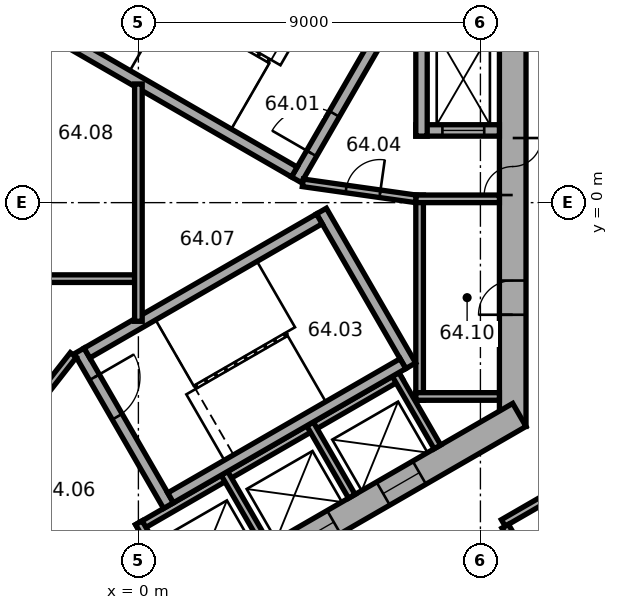
"""IFC4 building model, lengths in metres.
Left out: names, types, materials, properties, quantities, classifications, styles, units other than length and angle.
Written with IfcOpenShell. Run it as: python <this file> out.ifc"""

import sys

from ifc_helpers import new_model, si_unit, direction, frame, frame_2d, origin, place, context, subcontext, project, spatial, rectangle, extrude, element, fill, save


model = new_model("IFC4")
c1 = context("Model", 3, precision=1e-05, world=origin(), true_north=direction((0.0, 1.0)))
c2 = subcontext(c1, "Body", "Model", "MODEL_VIEW")
j1 = project(units=[si_unit("LENGTHUNIT", "METRE"), si_unit("PLANEANGLEUNIT", "RADIAN")], contexts=[c1])
p1 = place(None, origin())
s1 = spatial("IfcSite", under=j1, at=p1, CompositionType="ELEMENT")
p2 = place(p1, origin())
s2 = spatial("IfcBuilding", under=s1, at=p2, CompositionType="ELEMENT")
p3 = place(p2, frame((0.0, 0.0, 259.8)))
s3 = spatial("IfcBuildingStorey", under=s2, at=p3, CompositionType="ELEMENT", Elevation=259.8)
p4 = place(p3, frame((9.85, -5.889, 0.0), z_axis=(0.0, 0.0, 1.0), x_axis=(0.0, 1.0, 0.0)))
e1 = element("IfcWall", 1, at=p4, inside=s3, PredefinedType="SHEAR", context=c2, shape_type="SweptSolid", body=[
    extrude(rectangle(XDim=11.778, YDim=0.7, at=frame_2d((5.889, 0.0))), origin(), (0.0, 0.0, 1.0), 3.7),
])
p5 = place(p4, frame((6.089, 0.0, 0.0)))
e2 = element("IfcOpeningElement", 2, at=p5, cuts=e1, PredefinedType="OPENING", context=c2, shape_type="SweptSolid", body=[
    extrude(rectangle(XDim=1.5, YDim=2.1, at=frame_2d((0.75, 1.05))), frame((0.0, 0.36, 0.0), z_axis=(0.0, -1.0, 0.0), x_axis=(1.0, 0.0, 0.0)), (0.0, 0.0, 1.0), 0.72),
])
p6 = place(p4, frame((2.939, 0.0, 0.0)))
e3 = element("IfcOpeningElement", 3, at=p6, cuts=e1, PredefinedType="OPENING", context=c2, shape_type="SweptSolid", body=[
    extrude(rectangle(XDim=0.9, YDim=2.1, at=frame_2d((0.45, 1.05))), frame((0.0, 0.36, 0.0), z_axis=(0.0, -1.0, 0.0), x_axis=(1.0, 0.0, 0.0)), (0.0, 0.0, 1.0), 0.72),
])
p7 = place(p3, frame((-10.025, -5.586, 0.0), z_axis=(0.0, 0.0, 1.0), x_axis=(0.866026453023, -0.499998182661, 0.0)))
e4 = element("IfcWall", 4, at=p7, inside=s3, PredefinedType="SHEAR", context=c2, shape_type="SweptSolid", body=[
    extrude(rectangle(XDim=11.778, YDim=0.7, at=frame_2d((5.889, 0.0))), origin(), (0.0, 0.0, 1.0), 3.7),
])
p8 = place(p7, frame((6.089, 0.0, 0.0)))
e5 = element("IfcOpeningElement", 5, at=p8, cuts=e4, PredefinedType="OPENING", context=c2, shape_type="SweptSolid", body=[
    extrude(rectangle(XDim=1.5, YDim=2.1, at=frame_2d((0.75, 1.05))), frame((0.0, 0.36, 0.0), z_axis=(0.0, -1.0, 0.0), x_axis=(1.0, 0.0, 0.0)), (0.0, 0.0, 1.0), 0.72),
])
p9 = place(p7, frame((1.539, 0.0, 0.0)))
e6 = element("IfcOpeningElement", 6, at=p9, cuts=e4, PredefinedType="OPENING", context=c2, shape_type="SweptSolid", body=[
    extrude(rectangle(XDim=1.1, YDim=2.1, at=frame_2d((0.55, 1.05))), frame((0.0, 0.36, 0.0), z_axis=(0.0, -1.0, 0.0), x_axis=(1.0, 0.0, 0.0)), (0.0, 0.0, 1.0), 0.72),
])
p10 = place(p7, frame((4.139, 0.0, 0.0)))
e7 = element("IfcOpeningElement", 7, at=p10, cuts=e4, PredefinedType="OPENING", context=c2, shape_type="SweptSolid", body=[
    extrude(rectangle(XDim=1.1, YDim=2.1, at=frame_2d((0.55, 1.05))), frame((0.0, 0.36, 0.0), z_axis=(0.0, -1.0, 0.0), x_axis=(1.0, 0.0, 0.0)), (0.0, 0.0, 1.0), 0.72),
])
p11 = place(p3, frame((-0.175, -11.475, 0.0), z_axis=(0.0, 0.0, 1.0), x_axis=(0.866026453023, 0.499998182661, 0.0)))
e8 = element("IfcWall", 8, at=p11, inside=s3, PredefinedType="SHEAR", context=c2, shape_type="SweptSolid", body=[
    extrude(rectangle(XDim=11.778, YDim=0.7, at=frame_2d((5.889, 0.0))), origin(), (0.0, 0.0, 1.0), 3.7),
])
p12 = place(p11, frame((2.439, 0.0, 0.0)))
e9 = element("IfcOpeningElement", 9, at=p12, cuts=e8, PredefinedType="OPENING", context=c2, shape_type="SweptSolid", body=[
    extrude(rectangle(XDim=1.1, YDim=2.1, at=frame_2d((0.55, 1.05))), frame((0.0, 0.36, 0.0), z_axis=(0.0, -1.0, 0.0), x_axis=(1.0, 0.0, 0.0)), (0.0, 0.0, 1.0), 0.72),
])
p13 = place(p11, frame((5.039, 0.0, 0.0)))
e10 = element("IfcOpeningElement", 10, at=p13, cuts=e8, PredefinedType="OPENING", context=c2, shape_type="SweptSolid", body=[
    extrude(rectangle(XDim=1.1, YDim=2.1, at=frame_2d((0.55, 1.05))), frame((0.0, 0.36, 0.0), z_axis=(0.0, -1.0, 0.0), x_axis=(1.0, 0.0, 0.0)), (0.0, 0.0, 1.0), 0.72),
])
p14 = place(p11, frame((7.639, 0.0, 0.0)))
e11 = element("IfcOpeningElement", 11, at=p14, cuts=e8, PredefinedType="OPENING", context=c2, shape_type="SweptSolid", body=[
    extrude(rectangle(XDim=1.1, YDim=2.1, at=frame_2d((0.55, 1.05))), frame((0.0, 0.36, 0.0), z_axis=(0.0, -1.0, 0.0), x_axis=(1.0, 0.0, 0.0)), (0.0, 0.0, 1.0), 0.72),
])
p15 = place(p3, frame((7.4, -5.2, 0.0), z_axis=(0.0, 0.0, 1.0), x_axis=(0.0, 1.0, 0.0)))
e12 = element("IfcWall", 12, at=p15, inside=s3, PredefinedType="PARTITIONING", context=c2, shape_type="SweptSolid", body=[
    extrude(rectangle(XDim=5.4, YDim=0.2, at=frame_2d((2.7, 0.0))), origin(), (0.0, 0.0, 1.0), 3.42),
])
for number, where, z_axis, x_axis in (
    (13, (7.3, -5.1, 0.0), (0.0, 0.0, 1.0), (1.0, 0.0, 0.0)),
    (14, (7.3, 0.1, 0.0), (0.0, 0.0, 1.0), (1.0, 0.0, 0.0)),
):
    element("IfcWall", number, at=place(p3, frame(where, z_axis=z_axis, x_axis=x_axis)), inside=s3, PredefinedType="PARTITIONING", context=c2, shape_type="SweptSolid", body=[
        extrude(rectangle(XDim=2.2, YDim=0.2, at=frame_2d((1.1, 0.0))), origin(), (0.0, 0.0, 1.0), 3.42),
    ])
p16 = place(p3, frame((-0.024, -8.559, 0.0), z_axis=(0.0, 0.0, 1.0), x_axis=(0.866026010844, 0.49999894854, 0.0)))
e15 = element("IfcWall", 15, at=p16, inside=s3, PredefinedType="PARTITIONING", context=c2, shape_type="SweptSolid", body=[
    extrude(rectangle(XDim=8.0, YDim=0.2, at=frame_2d((4.0, 0.0))), origin(), (0.0, 0.0, 1.0), 3.42),
])
for number, where, z_axis, x_axis in (
    (16, (0.013, -8.422, 0.0), (0.0, 0.0, 1.0), (0.5, -0.866, 0.0)),
    (17, (2.264, -7.122, 0.0), (0.0, 0.0, 1.0), (0.5, -0.866, 0.0)),
    (18, (4.516, -5.822, 0.0), (0.0, 0.0, 1.0), (0.5, -0.866, 0.0)),
    (19, (6.768, -4.522, 0.0), (0.0, 0.0, 1.0), (0.5, -0.866, 0.0)),
):
    element("IfcWall", number, at=place(p3, frame(where, z_axis=z_axis, x_axis=x_axis)), inside=s3, PredefinedType="PARTITIONING", context=c2, shape_type="SweptSolid", body=[
        extrude(rectangle(XDim=2.2, YDim=0.2, at=frame_2d((1.1, 0.0))), origin(), (0.0, 0.0, 1.0), 3.42),
    ])
p17 = place(p3, frame((4.158, 0.602, 0.0), z_axis=(0.0, 0.0, 1.0), x_axis=(0.499977259774, 0.866038532462, 0.0)))
e20 = element("IfcWall", 20, at=p17, inside=s3, PredefinedType="SHEAR", context=c2, shape_type="SweptSolid", body=[
    extrude(rectangle(XDim=4.7, YDim=0.3, at=frame_2d((2.35, 0.0))), origin(), (0.0, 0.0, 1.0), 3.42),
])
p18 = place(p17, frame((0.8, 0.0, 0.0)))
e21 = element("IfcOpeningElement", 21, at=p18, cuts=e20, PredefinedType="OPENING", context=c2, shape_type="SweptSolid", body=[
    extrude(rectangle(XDim=1.2, YDim=2.1, at=frame_2d((0.6, 1.05))), frame((0.0, 0.16, 0.0), z_axis=(0.0, -1.0, 0.0), x_axis=(1.0, 0.0, 0.0)), (0.0, 0.0, 1.0), 0.32),
])
p19 = place(p3, frame((4.103, 0.807, 0.0), z_axis=(0.0, 0.0, 1.0), x_axis=(-0.866027801685, 0.499995846692, 0.0)))
e22 = element("IfcWall", 22, at=p19, inside=s3, PredefinedType="SHEAR", context=c2, shape_type="SweptSolid", body=[
    extrude(rectangle(XDim=7.06, YDim=0.3, at=frame_2d((3.53, 0.0))), origin(), (0.0, 0.0, 1.0), 3.42),
])
p20 = place(p3, frame((-1.558, -3.902, 0.0), z_axis=(0.0, 0.0, 1.0), x_axis=(0.499977259774, -0.866038532462, 0.0)))
e23 = element("IfcWall", 23, at=p20, inside=s3, PredefinedType="SHEAR", context=c2, shape_type="SweptSolid", body=[
    extrude(rectangle(XDim=4.7, YDim=0.3, at=frame_2d((2.35, 0.0))), origin(), (0.0, 0.0, 1.0), 3.42),
])
p21 = place(p20, frame((0.8, 0.0, 0.0)))
e24 = element("IfcOpeningElement", 24, at=p21, cuts=e23, PredefinedType="OPENING", context=c2, shape_type="SweptSolid", body=[
    extrude(rectangle(XDim=1.2, YDim=2.1, at=frame_2d((0.6, 1.05))), frame((0.0, 0.16, 0.0), z_axis=(0.0, -1.0, 0.0), x_axis=(1.0, 0.0, 0.0)), (0.0, 0.0, 1.0), 0.32),
])
p22 = place(p3, frame((4.816, -0.222, 0.0), z_axis=(0.0, 0.0, 1.0), x_axis=(0.499977259774, -0.866038532462, 0.0)))
e25 = element("IfcWall", 25, at=p22, inside=s3, PredefinedType="SHEAR", context=c2, shape_type="SweptSolid", body=[
    extrude(rectangle(XDim=4.7, YDim=0.3, at=frame_2d((2.35, 0.0))), origin(), (0.0, 0.0, 1.0), 3.42),
])
for number, where, z_axis, x_axis in (
    (26, (-1.353, -3.957, 0.0), (0.0, 0.0, 1.0), (0.866, 0.5, 0.0)),
    (27, (0.847, -7.767, 0.0), (0.0, 0.0, 1.0), (0.866, 0.5, 0.0)),
):
    element("IfcWall", number, at=place(p3, frame(where, z_axis=z_axis, x_axis=x_axis)), inside=s3, PredefinedType="SHEAR", context=c2, shape_type="SweptSolid", body=[
        extrude(rectangle(XDim=7.06, YDim=0.3, at=frame_2d((3.53, 0.0))), origin(), (0.0, 0.0, 1.0), 3.42),
    ])
p23 = place(p3, frame((7.3, 1.9, 0.0), z_axis=(0.0, 0.0, 1.0), x_axis=(1.0, 0.0, 0.0)))
e28 = element("IfcWall", 28, at=p23, inside=s3, PredefinedType="SHEAR", context=c2, shape_type="SweptSolid", body=[
    extrude(rectangle(XDim=2.2, YDim=0.3, at=frame_2d((1.1, 0.0))), origin(), (0.0, 0.0, 1.0), 3.42),
])
p24 = place(p23, frame((0.7, 0.0, 0.0)))
e29 = element("IfcOpeningElement", 29, at=p24, cuts=e28, PredefinedType="OPENING", context=c2, shape_type="SweptSolid", body=[
    extrude(rectangle(XDim=1.1, YDim=2.1, at=frame_2d((0.55, 1.05))), frame((0.0, 0.16, 0.0), z_axis=(0.0, -1.0, 0.0), x_axis=(1.0, 0.0, 0.0)), (0.0, 0.0, 1.0), 0.32),
])
p25 = place(p3, frame((7.45, 1.75, 0.0), z_axis=(0.0, 0.0, 1.0), x_axis=(0.0, 1.0, 0.0)))
e30 = element("IfcWall", 30, at=p25, inside=s3, PredefinedType="SHEAR", context=c2, shape_type="SweptSolid", body=[
    extrude(rectangle(XDim=3.35, YDim=0.3, at=frame_2d((1.675, 0.0))), origin(), (0.0, 0.0, 1.0), 3.42),
])
p26 = place(p3, frame((4.327, 0.521, 0.0), z_axis=(0.0, 0.0, 1.0), x_axis=(0.990124376366, -0.14019172346, 0.0)))
e31 = element("IfcWall", 31, at=p26, inside=s3, PredefinedType="PARTITIONING", context=c2, shape_type="SweptSolid", body=[
    extrude(rectangle(XDim=3.002, YDim=0.2, at=frame_2d((1.501, 0.0))), origin(), (0.0, 0.0, 1.0), 3.42),
])
p27 = place(p26, frame((1.15, 0.0, 0.0)))
e32 = element("IfcOpeningElement", 32, at=p27, cuts=e31, PredefinedType="OPENING", context=c2, shape_type="SweptSolid", body=[
    extrude(rectangle(XDim=0.9, YDim=2.1, at=frame_2d((0.45, 1.05))), frame((0.0, 0.11, 0.0), z_axis=(0.0, -1.0, 0.0), x_axis=(1.0, 0.0, 0.0)), (0.0, 0.0, 1.0), 0.22),
])
p28 = place(p3, frame((-1.712, -4.008, 0.0), z_axis=(0.0, 0.0, 1.0), x_axis=(-0.616549420702, -0.787316208287, 0.0)))
e33 = element("IfcWall", 33, at=p28, inside=s3, PredefinedType="PARTITIONING", context=c2, shape_type="SweptSolid", body=[
    extrude(rectangle(XDim=3.002, YDim=0.2, at=frame_2d((1.501, 0.0))), origin(), (0.0, 0.0, 1.0), 3.42),
])
p29 = place(p28, frame((1.15, 0.0, 0.0)))
e34 = element("IfcOpeningElement", 34, at=p29, cuts=e33, PredefinedType="OPENING", context=c2, shape_type="SweptSolid", body=[
    extrude(rectangle(XDim=0.9, YDim=2.1, at=frame_2d((0.45, 1.05))), frame((0.0, 0.11, 0.0), z_axis=(0.0, -1.0, 0.0), x_axis=(1.0, 0.0, 0.0)), (0.0, 0.0, 1.0), 0.22),
])
p30 = place(p3, frame((-2.72, -2.0, 0.0), z_axis=(0.0, 0.0, 1.0), x_axis=(1.0, 0.0, 0.0)))
e35 = element("IfcWall", 35, at=p30, inside=s3, PredefinedType="PARTITIONING", context=c2, shape_type="SweptSolid", body=[
    extrude(rectangle(XDim=2.62, YDim=0.2, at=frame_2d((1.31, 0.0))), origin(), (0.0, 0.0, 1.0), 3.42),
])
p31 = place(p3, frame((0.0, -3.122, 0.0), z_axis=(0.0, 0.0, 1.0), x_axis=(0.0, 1.0, 0.0)))
e36 = element("IfcWall", 36, at=p31, inside=s3, PredefinedType="PARTITIONING", context=c2, shape_type="SweptSolid", body=[
    extrude(rectangle(XDim=6.245, YDim=0.2, at=frame_2d((3.122, 0.0))), origin(), (0.0, 0.0, 1.0), 3.42),
])
p32 = place(p3, frame((9.602, -8.428, 0.0), z_axis=(0.0, 0.0, 1.0), x_axis=(0.865999114786, 0.500045531117, 0.0)))
e37 = element("IfcWall", 37, at=p32, inside=s3, PredefinedType="PARTITIONING", context=c2, shape_type="SweptSolid", body=[
    extrude(rectangle(XDim=1.788, YDim=0.2, at=frame_2d((0.894, 0.0))), origin(), (0.0, 0.0, 1.0), 3.42),
])
p33 = place(p3, frame((10.152, -9.382, 0.0), z_axis=(0.0, 0.0, 1.0), x_axis=(-0.499968756647, 0.866043441391, 0.0)))
e38 = element("IfcWall", 38, at=p33, inside=s3, PredefinedType="PARTITIONING", context=c2, shape_type="SweptSolid", body=[
    extrude(rectangle(XDim=1.001, YDim=0.2, at=frame_2d((0.5, 0.0))), origin(), (0.0, 0.0, 1.0), 3.42),
])
p34 = place(p5, origin())
e39 = element("IfcDoor", 39, at=p34, inside=s3, OperationType="DOUBLE_DOOR_SINGLE_SWING", PredefinedType="DOOR", context=c2, shape_type="SweptSolid", body=[
    extrude(rectangle(XDim=1.5, YDim=2.1, at=frame_2d((0.75, 1.05))), frame((0.0, 0.025, 0.0), z_axis=(0.0, -1.0, 0.0), x_axis=(1.0, 0.0, 0.0)), (0.0, 0.0, 1.0), 0.05),
])
fill(e2, e39)
p35 = place(p18, origin())
e40 = element("IfcDoor", 40, at=p35, inside=s3, OperationType="SINGLE_SWING_RIGHT", PredefinedType="DOOR", context=c2, shape_type="SweptSolid", body=[
    extrude(rectangle(XDim=1.2, YDim=2.1, at=frame_2d((0.6, 1.05))), frame((0.0, 0.025, 0.0), z_axis=(0.0, -1.0, 0.0), x_axis=(1.0, 0.0, 0.0)), (0.0, 0.0, 1.0), 0.05),
])
fill(e21, e40)
p36 = place(p21, origin())
e41 = element("IfcDoor", 41, at=p36, inside=s3, OperationType="SINGLE_SWING_RIGHT", PredefinedType="DOOR", context=c2, shape_type="SweptSolid", body=[
    extrude(rectangle(XDim=1.2, YDim=2.1, at=frame_2d((0.6, 1.05))), frame((0.0, 0.025, 0.0), z_axis=(0.0, -1.0, 0.0), x_axis=(1.0, 0.0, 0.0)), (0.0, 0.0, 1.0), 0.05),
])
fill(e24, e41)
p37 = place(p27, origin())
e42 = element("IfcDoor", 42, at=p37, inside=s3, OperationType="SINGLE_SWING_LEFT", PredefinedType="DOOR", context=c2, shape_type="SweptSolid", body=[
    extrude(rectangle(XDim=0.9, YDim=2.1, at=frame_2d((0.45, 1.05))), frame((0.0, 0.025, 0.0), z_axis=(0.0, -1.0, 0.0), x_axis=(1.0, 0.0, 0.0)), (0.0, 0.0, 1.0), 0.05),
])
fill(e32, e42)
p38 = place(p6, origin())
e43 = element("IfcDoor", 43, at=p38, inside=s3, OperationType="SINGLE_SWING_LEFT", PredefinedType="DOOR", context=c2, shape_type="SweptSolid", body=[
    extrude(rectangle(XDim=0.9, YDim=2.1, at=frame_2d((0.45, 1.05))), frame((0.0, 0.025, 0.0), z_axis=(0.0, -1.0, 0.0), x_axis=(1.0, 0.0, 0.0)), (0.0, 0.0, 1.0), 0.05),
])
fill(e3, e43)
p39 = place(p24, origin())
e44 = element("IfcDoor", 44, at=p39, inside=s3, OperationType="DOUBLE_DOOR_SLIDING", PredefinedType="DOOR", context=c2, shape_type="SweptSolid", body=[
    extrude(rectangle(XDim=1.1, YDim=2.1, at=frame_2d((0.55, 1.05))), frame((0.0, 0.025, 0.0), z_axis=(0.0, -1.0, 0.0), x_axis=(1.0, 0.0, 0.0)), (0.0, 0.0, 1.0), 0.05),
])
fill(e29, e44)
p40 = place(p13, origin())
e45 = element("IfcDoor", 45, at=p40, inside=s3, OperationType="DOUBLE_DOOR_SLIDING", PredefinedType="DOOR", context=c2, shape_type="SweptSolid", body=[
    extrude(rectangle(XDim=1.1, YDim=2.1, at=frame_2d((0.55, 1.05))), frame((0.0, 0.025, 0.0), z_axis=(0.0, -1.0, 0.0), x_axis=(1.0, 0.0, 0.0)), (0.0, 0.0, 1.0), 0.05),
])
fill(e10, e45)
p41 = place(p14, origin())
e46 = element("IfcDoor", 46, at=p41, inside=s3, OperationType="DOUBLE_DOOR_SLIDING", PredefinedType="DOOR", context=c2, shape_type="SweptSolid", body=[
    extrude(rectangle(XDim=1.1, YDim=2.1, at=frame_2d((0.55, 1.05))), frame((0.0, 0.025, 0.0), z_axis=(0.0, -1.0, 0.0), x_axis=(1.0, 0.0, 0.0)), (0.0, 0.0, 1.0), 0.05),
])
fill(e11, e46)
save(model, sys.argv[1])
